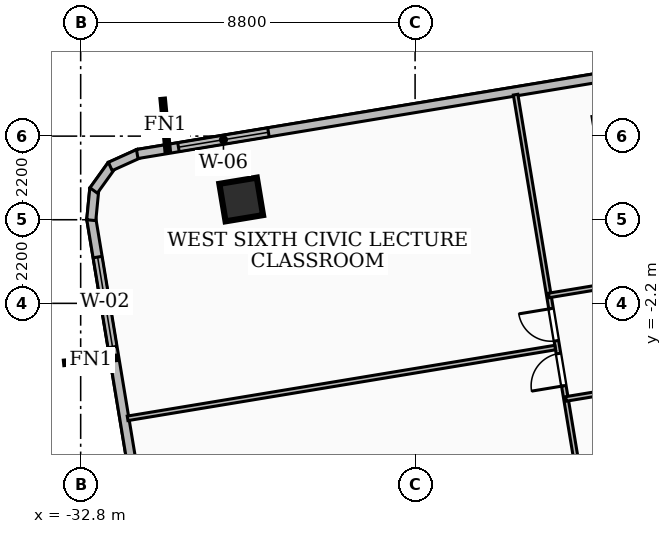
"""IFC4 building model, lengths in metres.
Left out: names, types, materials, properties, quantities, classifications, styles, units other than length and angle.
Written with IfcOpenShell. Run it as: python <this file> out.ifc"""

import sys

from ifc_helpers import new_model, si_unit, direction, frame, frame_2d, origin, origin_2d, place, context, subcontext, project, spatial, rectangle, extrude, element, fill, save


model = new_model("IFC4")
c1 = context("Model", 3, precision=1e-05, world=origin(), true_north=direction((0.0, 1.0)))
c2 = subcontext(c1, "Body", "Model", "MODEL_VIEW")
j1 = project(units=[si_unit("LENGTHUNIT", "METRE"), si_unit("PLANEANGLEUNIT", "RADIAN")], contexts=[c1])
p1 = place(None, origin())
s1 = spatial("IfcSite", under=j1, at=p1, CompositionType="ELEMENT")
p2 = place(p1, origin())
s2 = spatial("IfcBuilding", under=s1, at=p2, CompositionType="ELEMENT")
p3 = place(p2, frame((0.0, 0.0, 92.88)))
s3 = spatial("IfcBuildingStorey", under=s2, at=p3, CompositionType="ELEMENT", Elevation=92.88)
p4 = place(p3, frame((-28.576, 0.533, 0.0), z_axis=(0.0, 0.0, 1.0), x_axis=(0.986572161607, 0.163325962242, 0.0)))
e1 = element("IfcColumn", 1, at=p4, inside=s3, PredefinedType="COLUMN", context=c2, shape_type="SweptSolid", body=[
    extrude(rectangle(XDim=1.0, YDim=1.0, at=origin_2d()), origin(), (0.0, 0.0, 1.0), 3.6),
])
p5 = place(p3, frame((-30.864, -9.984, 0.0), z_axis=(0.0, 0.0, 1.0), x_axis=(-0.163307635867, 0.986575195344, 0.0)))
e2 = element("IfcWall", 2, at=p5, inside=s3, PredefinedType="SOLIDWALL", context=c2, shape_type="SweptSolid", body=[
    extrude(rectangle(XDim=10.158, YDim=0.24, at=frame_2d((5.079, 0.0))), origin(), (0.0, 0.0, 1.0), 3.34),
])
p6 = place(p5, frame((6.724, 0.0, 0.85)))
e3 = element("IfcOpeningElement", 3, at=p6, cuts=e2, PredefinedType="OPENING", context=c2, shape_type="SweptSolid", body=[
    extrude(rectangle(XDim=2.4, YDim=2.1, at=frame_2d((1.2, 1.05))), frame((0.0, 0.13, 0.0), z_axis=(0.0, -1.0, 0.0), x_axis=(1.0, 0.0, 0.0)), (0.0, 0.0, 1.0), 0.26),
])
p7 = place(p3, frame((-32.521, -0.012, 0.0), z_axis=(0.0, 0.0, 1.0), x_axis=(0.096389937095, 0.995343649212, 0.0)))
e4 = element("IfcWall", 4, at=p7, inside=s3, PredefinedType="SOLIDWALL", context=c2, shape_type="SweptSolid", body=[
    extrude(rectangle(XDim=0.831, YDim=0.24, at=frame_2d((0.416, 0.0))), origin(), (0.0, 0.0, 1.0), 3.34),
])
p8 = place(p3, frame((-32.458, 0.77, 0.0), z_axis=(0.0, 0.0, 1.0), x_axis=(0.583704032354, 0.811966503382, 0.0)))
e5 = element("IfcWall", 5, at=p8, inside=s3, PredefinedType="SOLIDWALL", context=c2, shape_type="SweptSolid", body=[
    extrude(rectangle(XDim=0.814, YDim=0.24, at=frame_2d((0.407, 0.0))), origin(), (0.0, 0.0, 1.0), 3.34),
])
p9 = place(p3, frame((-32.021, 1.401, 0.0), z_axis=(0.0, 0.0, 1.0), x_axis=(0.911310138196, 0.411720575173, 0.0)))
e6 = element("IfcWall", 6, at=p9, inside=s3, PredefinedType="SOLIDWALL", context=c2, shape_type="SweptSolid", body=[
    extrude(rectangle(XDim=0.831, YDim=0.24, at=frame_2d((0.416, 0.0))), origin(), (0.0, 0.0, 1.0), 3.34),
])
p10 = place(p3, frame((-31.312, 1.729, 0.0), z_axis=(0.0, 0.0, 1.0), x_axis=(0.986572947557, 0.163321214629, 0.0)))
e7 = element("IfcWall", 7, at=p10, inside=s3, PredefinedType="SOLIDWALL", context=c2, shape_type="SweptSolid", body=[
    extrude(rectangle(XDim=16.274, YDim=0.24, at=frame_2d((8.137, 0.0))), origin(), (0.0, 0.0, 1.0), 3.34),
])
p11 = place(p10, frame((1.1, 0.0, 0.85)))
e8 = element("IfcOpeningElement", 8, at=p11, cuts=e7, PredefinedType="OPENING", context=c2, shape_type="SweptSolid", body=[
    extrude(rectangle(XDim=2.4, YDim=1.85, at=frame_2d((1.2, 0.925))), frame((0.0, 0.13, 0.0), z_axis=(0.0, -1.0, 0.0), x_axis=(1.0, 0.0, 0.0)), (0.0, 0.0, 1.0), 0.26),
])
p12 = place(p3, frame((-20.029, -4.715, 0.0), z_axis=(0.0, 0.0, 1.0), x_axis=(0.986548927366, 0.163466247017, 0.0)))
e9 = element("IfcWall", 9, at=p12, inside=s3, PredefinedType="PARTITIONING", context=c2, shape_type="SweptSolid", body=[
    extrude(rectangle(XDim=6.24, YDim=0.12, at=frame_2d((3.12, 0.0))), origin(), (0.0, 0.0, 1.0), 3.34),
])
p13 = place(p12, frame((4.03, 0.0, 0.0)))
e10 = element("IfcOpeningElement", 10, at=p13, cuts=e9, PredefinedType="OPENING", context=c2, shape_type="SweptSolid", body=[
    extrude(rectangle(XDim=0.86, YDim=2.04, at=frame_2d((0.43, 1.02))), frame((0.0, 0.07, 0.0), z_axis=(0.0, -1.0, 0.0), x_axis=(1.0, 0.0, 0.0)), (0.0, 0.0, 1.0), 0.14),
])
p14 = place(p12, frame((0.91, 0.0, 0.0)))
e11 = element("IfcOpeningElement", 11, at=p14, cuts=e9, PredefinedType="OPENING", context=c2, shape_type="SweptSolid", body=[
    extrude(rectangle(XDim=0.86, YDim=2.04, at=frame_2d((0.43, 1.02))), frame((0.0, 0.07, 0.0), z_axis=(0.0, -1.0, 0.0), x_axis=(1.0, 0.0, 0.0)), (0.0, 0.0, 1.0), 0.14),
])
p15 = place(p3, frame((-14.324, -0.972, 0.0), z_axis=(0.0, 0.0, 1.0), x_axis=(-0.986548927366, -0.163466247017, 0.0)))
e12 = element("IfcWall", 12, at=p15, inside=s3, PredefinedType="PARTITIONING", context=c2, shape_type="SweptSolid", body=[
    extrude(rectangle(XDim=6.24, YDim=0.12, at=frame_2d((3.12, 0.0))), origin(), (0.0, 0.0, 1.0), 3.34),
])
p16 = place(p15, frame((0.91, 0.0, 0.0)))
e13 = element("IfcOpeningElement", 13, at=p16, cuts=e12, PredefinedType="OPENING", context=c2, shape_type="SweptSolid", body=[
    extrude(rectangle(XDim=0.86, YDim=2.04, at=frame_2d((0.43, 1.02))), frame((0.0, 0.07, 0.0), z_axis=(0.0, -1.0, 0.0), x_axis=(1.0, 0.0, 0.0)), (0.0, 0.0, 1.0), 0.14),
])
p17 = place(p15, frame((4.03, 0.0, 0.0)))
e14 = element("IfcOpeningElement", 14, at=p17, cuts=e12, PredefinedType="OPENING", context=c2, shape_type="SweptSolid", body=[
    extrude(rectangle(XDim=0.86, YDim=2.04, at=frame_2d((0.43, 1.02))), frame((0.0, 0.07, 0.0), z_axis=(0.0, -1.0, 0.0), x_axis=(1.0, 0.0, 0.0)), (0.0, 0.0, 1.0), 0.14),
])
p18 = place(p3, frame((-20.314, -3.363, 0.0), z_axis=(0.0, 0.0, 1.0), x_axis=(-0.986565802435, -0.163364370245, 0.0)))
e15 = element("IfcWall", 15, at=p18, inside=s3, PredefinedType="PARTITIONING", context=c2, shape_type="SweptSolid", body=[
    extrude(rectangle(XDim=11.404, YDim=0.12, at=frame_2d((5.702, 0.0))), origin(), (0.0, 0.0, 1.0), 2.832),
])
p19 = place(p3, frame((-19.243, -9.465, 0.0), z_axis=(0.0, 0.0, 1.0), x_axis=(-0.163348643691, 0.98656840645, 0.0)))
e16 = element("IfcWall", 16, at=p19, inside=s3, PredefinedType="PARTITIONING", context=c2, shape_type="SweptSolid", body=[
    extrude(rectangle(XDim=12.93, YDim=0.12, at=frame_2d((6.465, 0.0))), origin(), (0.0, 0.0, 1.0), 2.486),
])
p20 = place(p19, frame((6.365, 0.0, 0.0)))
e17 = element("IfcOpeningElement", 17, at=p20, cuts=e16, PredefinedType="OPENING", context=c2, shape_type="SweptSolid", body=[
    extrude(rectangle(XDim=0.86, YDim=2.04, at=frame_2d((0.43, 1.02))), frame((0.0, 0.07, 0.0), z_axis=(0.0, -1.0, 0.0), x_axis=(1.0, 0.0, 0.0)), (0.0, 0.0, 1.0), 0.14),
])
p21 = place(p19, frame((5.165, 0.0, 0.0)))
e18 = element("IfcOpeningElement", 18, at=p21, cuts=e16, PredefinedType="OPENING", context=c2, shape_type="SweptSolid", body=[
    extrude(rectangle(XDim=0.86, YDim=2.04, at=frame_2d((0.43, 1.02))), frame((0.0, 0.07, 0.0), z_axis=(0.0, -1.0, 0.0), x_axis=(1.0, 0.0, 0.0)), (0.0, 0.0, 1.0), 0.14),
])
p22 = place(p6, origin())
e19 = element("IfcWindow", 19, at=p22, inside=s3, PartitioningType="SINGLE_PANEL", PredefinedType="WINDOW", context=c2, shape_type="SweptSolid", body=[
    extrude(rectangle(XDim=2.4, YDim=2.1, at=frame_2d((1.2, 1.05))), frame((0.0, 0.03, 0.0), z_axis=(0.0, -1.0, 0.0), x_axis=(1.0, 0.0, 0.0)), (0.0, 0.0, 1.0), 0.06),
])
fill(e3, e19)
p23 = place(p11, origin())
e20 = element("IfcWindow", 20, at=p23, inside=s3, PartitioningType="SINGLE_PANEL", PredefinedType="WINDOW", context=c2, shape_type="SweptSolid", body=[
    extrude(rectangle(XDim=2.4, YDim=1.85, at=frame_2d((1.2, 0.925))), frame((0.0, 0.03, 0.0), z_axis=(0.0, -1.0, 0.0), x_axis=(1.0, 0.0, 0.0)), (0.0, 0.0, 1.0), 0.06),
])
fill(e8, e20)
p24 = place(p20, origin())
e21 = element("IfcDoor", 21, at=p24, inside=s3, OperationType="SINGLE_SWING_RIGHT", PredefinedType="DOOR", context=c2, shape_type="SweptSolid", body=[
    extrude(rectangle(XDim=0.86, YDim=2.04, at=frame_2d((0.43, 1.02))), frame((0.0, 0.025, 0.0), z_axis=(0.0, -1.0, 0.0), x_axis=(1.0, 0.0, 0.0)), (0.0, 0.0, 1.0), 0.05),
])
fill(e17, e21)
p25 = place(p21, origin())
e22 = element("IfcDoor", 22, at=p25, inside=s3, OperationType="SINGLE_SWING_LEFT", PredefinedType="DOOR", context=c2, shape_type="SweptSolid", body=[
    extrude(rectangle(XDim=0.86, YDim=2.04, at=frame_2d((0.43, 1.02))), frame((0.0, 0.025, 0.0), z_axis=(0.0, -1.0, 0.0), x_axis=(1.0, 0.0, 0.0)), (0.0, 0.0, 1.0), 0.05),
])
fill(e18, e22)
save(model, sys.argv[1])
